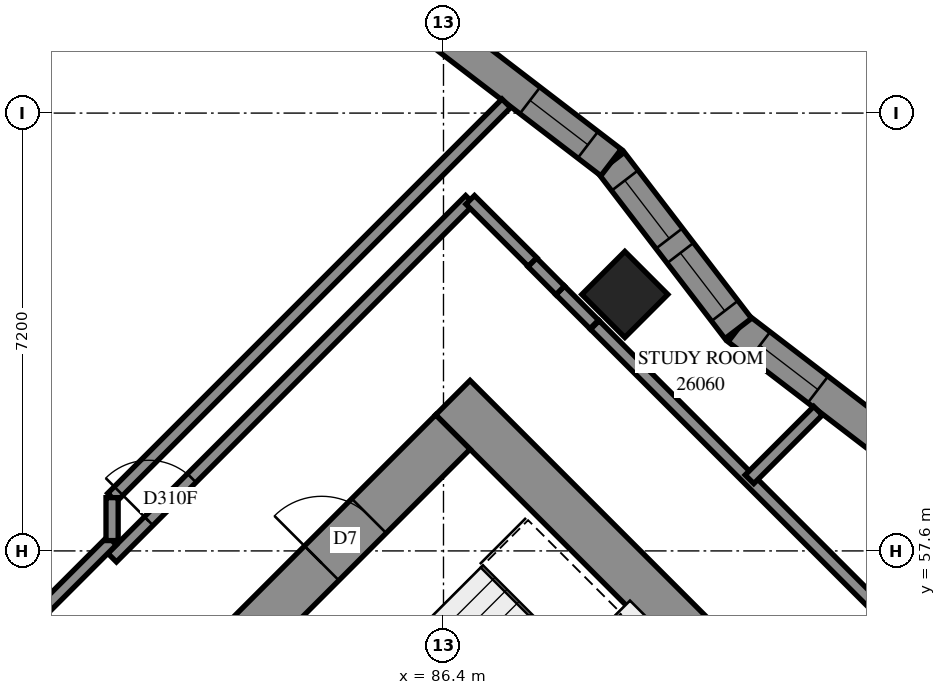
"""IFC4 building model, lengths in metres.
Left out: names, types, materials, properties, quantities, classifications, styles, units other than length and angle.
Written with IfcOpenShell. Run it as: python <this file> out.ifc"""

import sys

from ifc_helpers import new_model, si_unit, direction, frame, frame_2d, origin, origin_2d, place, context, subcontext, project, spatial, polyline, rectangle, outline, extrude, element, fill, save


model = new_model("IFC4")
c1 = context("Model", 3, precision=1e-05, world=origin(), true_north=direction((0.0, 1.0)))
c2 = subcontext(c1, "Body", "Model", "MODEL_VIEW")
j1 = project(units=[si_unit("LENGTHUNIT", "METRE"), si_unit("PLANEANGLEUNIT", "RADIAN")], contexts=[c1])
p1 = place(None, origin())
s1 = spatial("IfcSite", under=j1, at=p1, CompositionType="ELEMENT")
p2 = place(p1, origin())
s2 = spatial("IfcBuilding", under=s1, at=p2, CompositionType="ELEMENT")
p3 = place(p2, frame((0.0, 0.0, 98.2)))
s3 = spatial("IfcBuildingStorey", under=s2, at=p3, CompositionType="ELEMENT", Elevation=98.2)
p4 = place(p3, frame((89.382, 61.818, 0.0), z_axis=(0.0, 0.0, 1.0), x_axis=(0.7071067812, -0.7071067812, 0.0)))
e1 = element("IfcColumn", 1, at=p4, inside=s3, PredefinedType="COLUMN", context=c2, shape_type="SweptSolid", body=[
    extrude(rectangle(XDim=1.0, YDim=1.0, at=origin_2d()), origin(), (0.0, 0.0, 1.0), 3.1),
])
p5 = place(p3, frame((86.554, 60.121, -0.3), z_axis=(0.0, 0.0, 1.0), x_axis=(0.7071067812, -0.7071067812, 0.0)))
e2 = element("IfcWall", 2, at=p5, inside=s3, PredefinedType="SHEAR", context=c2, shape_type="SweptSolid", body=[
    extrude(rectangle(XDim=16.0, YDim=0.8, at=frame_2d((8.0, 0.0))), origin(), (0.0, 0.0, 1.0), 2.7),
])
p6 = place(p5, frame((10.8, 0.0, 0.3)))
e3 = element("IfcOpeningElement", 3, at=p6, cuts=e2, PredefinedType="OPENING", context=c2, shape_type="SweptSolid", body=[
    extrude(rectangle(XDim=0.8, YDim=2.1, at=frame_2d((0.4, 1.05))), frame((0.0, 0.41, 0.0), z_axis=(0.0, -1.0, 0.0), x_axis=(1.0, 0.0, 0.0)), (0.0, 0.0, 1.0), 0.82),
])
p7 = place(p3, frame((76.372, 49.373, -0.3), z_axis=(0.0, 0.0, 1.0), x_axis=(0.7071067812, 0.7071067812, 0.0)))
e4 = element("IfcWall", 4, at=p7, inside=s3, PredefinedType="SHEAR", context=c2, shape_type="SweptSolid", body=[
    extrude(rectangle(XDim=14.4, YDim=0.8, at=frame_2d((7.2, 0.0))), origin(), (0.0, 0.0, 1.0), 2.7),
])
p8 = place(p7, frame((4.55, 0.0, 0.3)))
e5 = element("IfcOpeningElement", 5, at=p8, cuts=e4, PredefinedType="OPENING", context=c2, shape_type="SweptSolid", body=[
    extrude(rectangle(XDim=1.1, YDim=2.1, at=frame_2d((0.55, 1.05))), frame((0.0, 0.41, 0.0), z_axis=(0.0, -1.0, 0.0), x_axis=(1.0, 0.0, 0.0)), (0.0, 0.0, 1.0), 0.82),
])
p9 = place(p7, frame((11.35, 0.0, 0.3)))
e6 = element("IfcOpeningElement", 6, at=p9, cuts=e4, PredefinedType="OPENING", context=c2, shape_type="SweptSolid", body=[
    extrude(rectangle(XDim=1.1, YDim=2.1, at=frame_2d((0.55, 1.05))), frame((0.0, 0.41, 0.0), z_axis=(0.0, -1.0, 0.0), x_axis=(1.0, 0.0, 0.0)), (0.0, 0.0, 1.0), 0.82),
])
p10 = place(p3, frame((93.977, 59.166, 0.0), z_axis=(0.0, 0.0, 1.0), x_axis=(-0.7937392534, 0.6082581669, 0.0)))
e7 = element("IfcWall", 7, at=p10, inside=s3, PredefinedType="SOLIDWALL", context=c2, shape_type="SweptSolid", body=[
    extrude(outline(polyline([(-0.036, -0.275), (3.403, -0.275), (3.475, 0.275), (0.036, 0.275), (-0.036, -0.275)])), origin(), (0.0, 0.0, 1.0), 3.1),
])
p11 = place(p10, frame((1.788, 0.0, 0.5)))
e8 = element("IfcOpeningElement", 8, at=p11, cuts=e7, PredefinedType="OPENING", context=c2, shape_type="SweptSolid", body=[
    extrude(rectangle(XDim=1.2, YDim=2.45, at=frame_2d((0.6, 1.225))), frame((0.0, 0.285, 0.0), z_axis=(0.0, -1.0, 0.0), x_axis=(1.0, 0.0, 0.0)), (0.0, 0.0, 1.0), 0.57),
])
p12 = place(p3, frame((91.247, 61.257, 0.0), z_axis=(0.0, 0.0, 1.0), x_axis=(-0.6082581669, 0.7937392534, 0.0)))
e9 = element("IfcWall", 9, at=p12, inside=s3, PredefinedType="SOLIDWALL", context=c2, shape_type="SweptSolid", body=[
    extrude(outline(polyline([(0.036, -0.275), (3.475, -0.275), (3.403, 0.275), (-0.036, 0.275), (0.036, -0.275)])), origin(), (0.0, 0.0, 1.0), 3.1),
])
p13 = place(p12, frame((0.365, 0.0, 0.5)))
e10 = element("IfcOpeningElement", 10, at=p13, cuts=e9, PredefinedType="OPENING", context=c2, shape_type="SweptSolid", body=[
    extrude(rectangle(XDim=1.2, YDim=2.45, at=frame_2d((0.6, 1.225))), frame((0.0, 0.285, 0.0), z_axis=(0.0, -1.0, 0.0), x_axis=(1.0, 0.0, 0.0)), (0.0, 0.0, 1.0), 0.57),
])
p14 = place(p12, frame((1.866, 0.0, 0.5)))
e11 = element("IfcOpeningElement", 11, at=p14, cuts=e9, PredefinedType="OPENING", context=c2, shape_type="SweptSolid", body=[
    extrude(rectangle(XDim=1.2, YDim=2.45, at=frame_2d((0.6, 1.225))), frame((0.0, 0.285, 0.0), z_axis=(0.0, -1.0, 0.0), x_axis=(1.0, 0.0, 0.0)), (0.0, 0.0, 1.0), 0.57),
])
p15 = place(p3, frame((89.155, 63.987, 0.0), z_axis=(0.0, 0.0, 1.0), x_axis=(-0.7937284952, 0.6082722054, 0.0)))
e12 = element("IfcWall", 12, at=p15, inside=s3, PredefinedType="SOLIDWALL", context=c2, shape_type="SweptSolid", body=[
    extrude(outline(polyline([(-0.036, -0.275), (3.403, -0.275), (3.475, 0.275), (0.036, 0.275), (-0.036, -0.275)])), origin(), (0.0, 0.0, 1.0), 3.1),
])
p16 = place(p15, frame((0.479, 0.0, 0.5)))
e13 = element("IfcOpeningElement", 13, at=p16, cuts=e12, PredefinedType="OPENING", context=c2, shape_type="SweptSolid", body=[
    extrude(rectangle(XDim=1.2, YDim=2.45, at=frame_2d((0.6, 1.225))), frame((0.0, 0.285, 0.0), z_axis=(0.0, -1.0, 0.0), x_axis=(1.0, 0.0, 0.0)), (0.0, 0.0, 1.0), 0.57),
])
p17 = place(p3, frame((80.949, 58.477, 0.0), z_axis=(0.0, 0.0, 1.0), x_axis=(0.7071067812, 0.7071067812, 0.0)))
e14 = element("IfcWall", 14, at=p17, inside=s3, PredefinedType="PARTITIONING", context=c2, shape_type="SweptSolid", body=[
    extrude(rectangle(XDim=9.169, YDim=0.2, at=frame_2d((4.585, 0.0))), origin(), (0.0, 0.0, 1.0), 3.1),
])
p18 = place(p3, frame((80.951, 57.489, 0.0), z_axis=(0.0, 0.0, 1.0), x_axis=(0.7071067812, 0.7071067812, 0.0)))
e15 = element("IfcWall", 15, at=p18, inside=s3, PredefinedType="PARTITIONING", context=c2, shape_type="SweptSolid", body=[
    extrude(rectangle(XDim=8.321, YDim=0.2, at=frame_2d((4.161, 0.0))), origin(), (0.0, 0.0, 1.0), 3.1),
])
p19 = place(p18, frame((0.851, 0.0, 0.0)))
e16 = element("IfcOpeningElement", 16, at=p19, cuts=e15, PredefinedType="OPENING", context=c2, shape_type="SweptSolid", body=[
    extrude(rectangle(XDim=1.0, YDim=2.1, at=frame_2d((0.5, 1.05))), frame((0.0, 0.11, 0.0), z_axis=(0.0, -1.0, 0.0), x_axis=(1.0, 0.0, 0.0)), (0.0, 0.0, 1.0), 0.22),
])
p20 = place(p3, frame((88.889, 61.315, 0.0), z_axis=(0.0, 0.0, 1.0), x_axis=(0.7071067812, -0.7071067812, 0.0)))
e17 = element("IfcWall", 17, at=p20, inside=s3, PredefinedType="PARTITIONING", context=c2, shape_type="SweptSolid", body=[
    extrude(rectangle(XDim=7.187, YDim=0.2, at=frame_2d((3.594, 0.0))), origin(), (0.0, 0.0, 1.0), 3.1),
])
p21 = place(p3, frame((79.802, 56.623, 0.0), z_axis=(0.0, 0.0, 1.0), x_axis=(0.7071067812, 0.7071067812, 0.0)))
e18 = element("IfcWall", 18, at=p21, inside=s3, PredefinedType="PARTITIONING", context=c2, shape_type="SweptSolid", body=[
    extrude(rectangle(XDim=1.623, YDim=0.2, at=frame_2d((0.812, 0.0))), origin(), (0.0, 0.0, 1.0), 3.1),
])
p22 = place(p3, frame((91.432, 58.778, 0.0), z_axis=(0.0, 0.0, 1.0), x_axis=(0.7070754218, 0.7071381392, 0.0)))
e19 = element("IfcWall", 19, at=p22, inside=s3, PredefinedType="PARTITIONING", context=c2, shape_type="SweptSolid", body=[
    extrude(rectangle(XDim=1.595, YDim=0.2, at=frame_2d((0.797, 0.0))), origin(), (0.0, 0.0, 1.0), 3.1),
])
p23 = place(p3, frame((86.839, 63.373, 0.0), z_axis=(0.0, 0.0, 1.0), x_axis=(0.7077963046, -0.7064165847, 0.0)))
e20 = element("IfcWall", 20, at=p23, inside=s3, PredefinedType="PARTITIONING", context=c2, shape_type="SweptSolid", body=[
    extrude(rectangle(XDim=1.45, YDim=0.2, at=frame_2d((0.725, 0.0))), origin(), (0.0, 0.0, 1.0), 3.1),
])
p24 = place(p3, frame((88.319, 61.885, 0.0), z_axis=(0.0, 0.0, 1.0), x_axis=(0.7071067812, -0.7071067812, 0.0)))
e21 = element("IfcWall", 21, at=p24, inside=s3, PredefinedType="PARTITIONING", context=c2, shape_type="SweptSolid", body=[
    extrude(rectangle(XDim=0.792, YDim=0.2, at=frame_2d((0.396, 0.0))), origin(), (0.0, 0.0, 1.0), 3.1),
])
p25 = place(p3, frame((80.95, 57.77, 0.0), z_axis=(0.0, 0.0, 1.0), x_axis=(0.0, 1.0, 0.0)))
e22 = element("IfcWall", 22, at=p25, inside=s3, PredefinedType="PARTITIONING", context=c2, shape_type="SweptSolid", body=[
    extrude(rectangle(XDim=0.706, YDim=0.2, at=frame_2d((0.353, 0.0))), origin(), (0.0, 0.0, 1.0), 3.1),
])
p26 = place(p3, frame((87.861, 62.344, 0.0), z_axis=(0.0, 0.0, 1.0), x_axis=(0.7055645691, -0.708645637, 0.0)))
e23 = element("IfcWall", 23, at=p26, inside=s3, PredefinedType="PARTITIONING", context=c2, shape_type="SweptSolid", body=[
    extrude(rectangle(XDim=0.649, YDim=0.2, at=frame_2d((0.325, 0.0))), origin(), (0.0, 0.0, 1.0), 3.1),
])
p27 = place(p11, origin())
e24 = element("IfcWindow", 24, at=p27, inside=s3, PartitioningType="SINGLE_PANEL", PredefinedType="WINDOW", context=c2, shape_type="SweptSolid", body=[
    extrude(rectangle(XDim=1.2, YDim=2.45, at=frame_2d((0.6, 1.225))), frame((0.0, 0.155, 0.0), z_axis=(0.0, -1.0, 0.0), x_axis=(1.0, 0.0, 0.0)), (0.0, 0.0, 1.0), 0.06),
])
fill(e8, e24)
p28 = place(p13, origin())
e25 = element("IfcWindow", 25, at=p28, inside=s3, PartitioningType="SINGLE_PANEL", PredefinedType="WINDOW", context=c2, shape_type="SweptSolid", body=[
    extrude(rectangle(XDim=1.2, YDim=2.45, at=frame_2d((0.6, 1.225))), frame((0.0, 0.155, 0.0), z_axis=(0.0, -1.0, 0.0), x_axis=(1.0, 0.0, 0.0)), (0.0, 0.0, 1.0), 0.06),
])
fill(e10, e25)
p29 = place(p14, origin())
e26 = element("IfcWindow", 26, at=p29, inside=s3, PartitioningType="SINGLE_PANEL", PredefinedType="WINDOW", context=c2, shape_type="SweptSolid", body=[
    extrude(rectangle(XDim=1.2, YDim=2.45, at=frame_2d((0.6, 1.225))), frame((0.0, 0.155, 0.0), z_axis=(0.0, -1.0, 0.0), x_axis=(1.0, 0.0, 0.0)), (0.0, 0.0, 1.0), 0.06),
])
fill(e11, e26)
p30 = place(p16, origin())
e27 = element("IfcWindow", 27, at=p30, inside=s3, PartitioningType="SINGLE_PANEL", PredefinedType="WINDOW", context=c2, shape_type="SweptSolid", body=[
    extrude(rectangle(XDim=1.2, YDim=2.45, at=frame_2d((0.6, 1.225))), frame((0.0, 0.155, 0.0), z_axis=(0.0, -1.0, 0.0), x_axis=(1.0, 0.0, 0.0)), (0.0, 0.0, 1.0), 0.06),
])
fill(e13, e27)
p31 = place(p9, origin())
e28 = element("IfcDoor", 28, at=p31, inside=s3, OperationType="SINGLE_SWING_LEFT", PredefinedType="DOOR", context=c2, shape_type="SweptSolid", body=[
    extrude(rectangle(XDim=1.1, YDim=2.1, at=frame_2d((0.55, 1.05))), frame((0.0, 0.025, 0.0), z_axis=(0.0, -1.0, 0.0), x_axis=(1.0, 0.0, 0.0)), (0.0, 0.0, 1.0), 0.05),
])
fill(e6, e28)
p32 = place(p19, origin())
e29 = element("IfcDoor", 29, at=p32, inside=s3, OperationType="SINGLE_SWING_RIGHT", PredefinedType="DOOR", context=c2, shape_type="SweptSolid", body=[
    extrude(rectangle(XDim=1.0, YDim=2.1, at=frame_2d((0.5, 1.05))), frame((0.0, 0.025, 0.0), z_axis=(0.0, -1.0, 0.0), x_axis=(1.0, 0.0, 0.0)), (0.0, 0.0, 1.0), 0.05),
])
fill(e16, e29)
save(model, sys.argv[1])
